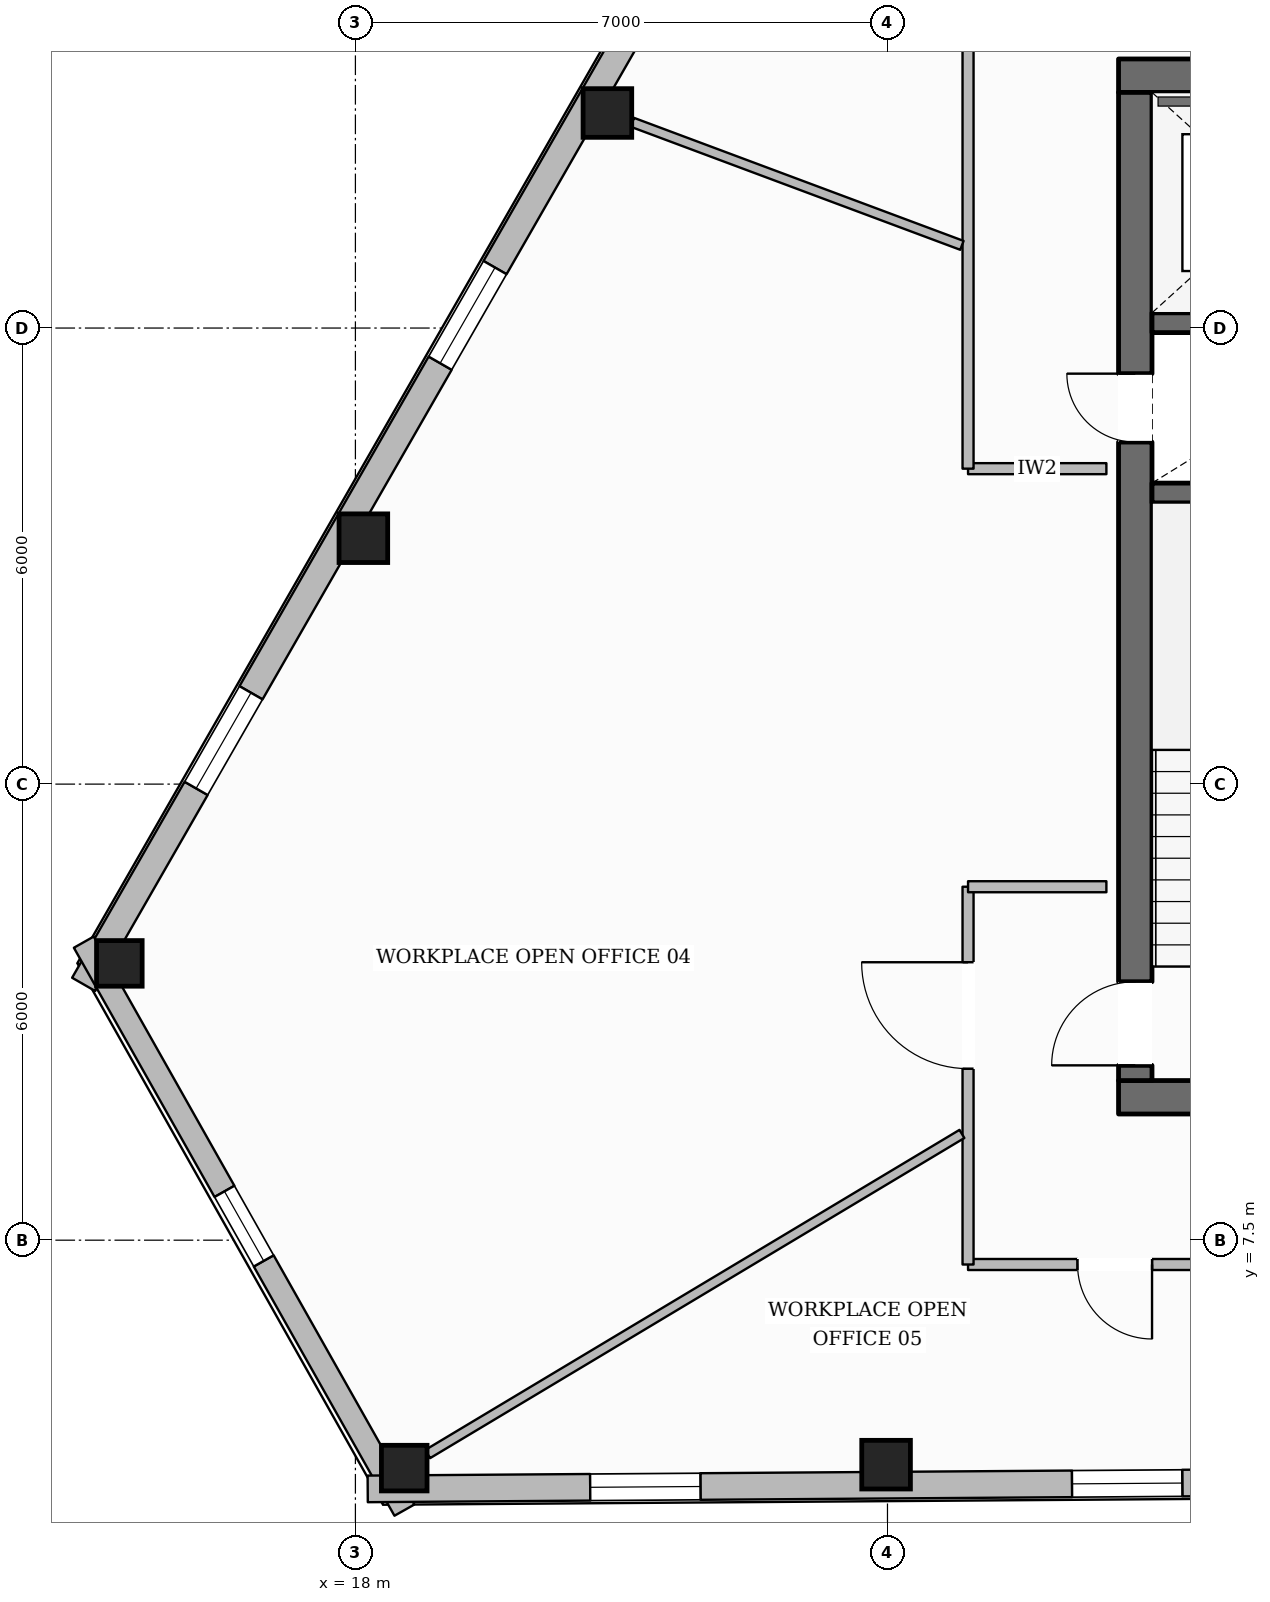
"""IFC4 building model, lengths in metres.
Left out: names, types, materials, properties, quantities, classifications, styles, units other than length and angle.
Written with IfcOpenShell. Run it as: python <this file> out.ifc"""

import sys

from ifc_helpers import new_model, si_unit, direction, frame, frame_2d, origin, origin_2d, place, context, subcontext, project, spatial, rectangle, hollow_rectangle, extrude, element, fill, save


model = new_model("IFC4")
c1 = context("Model", 3, precision=1e-05, world=origin(), true_north=direction((0.0, 1.0)))
c2 = subcontext(c1, "Body", "Model", "MODEL_VIEW")
j1 = project(units=[si_unit("LENGTHUNIT", "METRE"), si_unit("PLANEANGLEUNIT", "RADIAN")], contexts=[c1])
p1 = place(None, origin())
s1 = spatial("IfcSite", under=j1, at=p1, CompositionType="ELEMENT")
p2 = place(p1, origin())
s2 = spatial("IfcBuilding", under=s1, at=p2, CompositionType="ELEMENT")
p3 = place(p2, frame((0.0, 0.0, 226.6)))
s3 = spatial("IfcBuildingStorey", under=s2, at=p3, CompositionType="ELEMENT", Elevation=226.6)
p4 = place(p3, frame((28.04, 9.38, 0.0), z_axis=(0.0, 0.0, 1.0), x_axis=(1.0, 0.0, 0.0)))
e1 = element("IfcWall", 1, at=p4, inside=s3, PredefinedType="SOLIDWALL", context=c2, shape_type="SweptSolid", body=[
    extrude(rectangle(XDim=19.92, YDim=0.44, at=frame_2d((9.96, 0.0))), origin(), (0.0, 0.0, 1.0), 3.6),
])
p5 = place(p4, frame((10.46, 0.0, 0.0)))
e2 = element("IfcOpeningElement", 2, at=p5, cuts=e1, PredefinedType="OPENING", context=c2, shape_type="SweptSolid", body=[
    extrude(rectangle(XDim=1.4, YDim=2.2, at=frame_2d((0.7, 1.1))), frame((0.0, 0.23, 0.0), z_axis=(0.0, -1.0, 0.0), x_axis=(1.0, 0.0, 0.0)), (0.0, 0.0, 1.0), 0.46),
])
p6 = place(p3, frame((28.04, 22.82, 0.0), z_axis=(0.0, 0.0, 1.0), x_axis=(1.0, 0.0, 0.0)))
e3 = element("IfcWall", 3, at=p6, inside=s3, PredefinedType="SOLIDWALL", context=c2, shape_type="SweptSolid", body=[
    extrude(rectangle(XDim=19.92, YDim=0.44, at=frame_2d((9.96, 0.0))), origin(), (0.0, 0.0, 1.0), 3.6),
])
p7 = place(p6, frame((6.235, 0.0, 0.0)))
e4 = element("IfcOpeningElement", 4, at=p7, cuts=e3, PredefinedType="OPENING", context=c2, shape_type="SweptSolid", body=[
    extrude(rectangle(XDim=1.05, YDim=2.15, at=frame_2d((0.525, 1.075))), frame((0.0, 0.23, 0.0), z_axis=(0.0, -1.0, 0.0), x_axis=(1.0, 0.0, 0.0)), (0.0, 0.0, 1.0), 0.46),
])
p8 = place(p6, frame((12.635, 0.0, 0.0)))
e5 = element("IfcOpeningElement", 5, at=p8, cuts=e3, PredefinedType="OPENING", context=c2, shape_type="SweptSolid", body=[
    extrude(rectangle(XDim=1.05, YDim=2.15, at=frame_2d((0.525, 1.075))), frame((0.0, 0.23, 0.0), z_axis=(0.0, -1.0, 0.0), x_axis=(1.0, 0.0, 0.0)), (0.0, 0.0, 1.0), 0.46),
])
p9 = place(p3, frame((28.26, 9.6, 0.0), z_axis=(0.0, 0.0, 1.0), x_axis=(0.0, 1.0, 0.0)))
e6 = element("IfcWall", 6, at=p9, inside=s3, PredefinedType="SOLIDWALL", context=c2, shape_type="SweptSolid", body=[
    extrude(rectangle(XDim=13.0, YDim=0.44, at=frame_2d((6.5, 0.0))), origin(), (0.0, 0.0, 1.0), 3.6),
])
p10 = place(p9, frame((0.2, 0.0, 0.0)))
e7 = element("IfcOpeningElement", 7, at=p10, cuts=e6, PredefinedType="OPENING", context=c2, shape_type="SweptSolid", body=[
    extrude(rectangle(XDim=1.1, YDim=2.15, at=frame_2d((0.55, 1.075))), frame((0.0, 0.23, 0.0), z_axis=(0.0, -1.0, 0.0), x_axis=(1.0, 0.0, 0.0)), (0.0, 0.0, 1.0), 0.46),
])
p11 = place(p9, frame((8.4, 0.0, 0.0)))
e8 = element("IfcOpeningElement", 8, at=p11, cuts=e6, PredefinedType="OPENING", context=c2, shape_type="SweptSolid", body=[
    extrude(rectangle(XDim=0.9, YDim=2.1, at=frame_2d((0.45, 1.05))), frame((0.0, 0.23, 0.0), z_axis=(0.0, -1.0, 0.0), x_axis=(1.0, 0.0, 0.0)), (0.0, 0.0, 1.0), 0.46),
])
for number, where, z_axis, x_axis in (
    (9, (28.48, 17.33, 0.0), (0.0, 0.0, 1.0), (1.0, 0.0, 0.0)),
    (10, (28.48, 19.57, 0.0), (0.0, 0.0, 1.0), (1.0, 0.0, 0.0)),
):
    element("IfcWall", number, at=place(p3, frame(where, z_axis=z_axis, x_axis=x_axis)), inside=s3, PredefinedType="SHEAR", context=c2, shape_type="SweptSolid", body=[
        extrude(rectangle(XDim=3.2, YDim=0.26, at=frame_2d((1.6, 0.0))), origin(), (0.0, 0.0, 1.0), 3.6),
    ])
for number, where, z_axis, x_axis in (
    (11, (21.315, 22.329, 0.0), (0.0, 0.0, 1.0), (1.0, 0.0, 0.0)),
    (12, (18.105, 16.735, 0.0), (0.0, 0.0, 1.0), (1.0, 0.0, 0.0)),
):
    element("IfcColumn", number, at=place(p3, frame(where, z_axis=z_axis, x_axis=x_axis)), inside=s3, PredefinedType="COLUMN", context=c2, shape_type="SweptSolid", body=[
        extrude(hollow_rectangle(XDim=0.64, YDim=0.64, WallThickness=0.028, at=origin_2d()), origin(), (0.0, 0.0, 1.0), 3.6),
    ])
for number, where, z_axis, x_axis in (
    (13, (14.894, 11.141, 0.0), (0.0, 0.0, 1.0), (1.0, 0.0, 0.0)),
    (14, (18.642, 4.501, 0.0), (0.0, 0.0, 1.0), (1.0, 0.0, 0.0)),
):
    element("IfcColumn", number, at=place(p3, frame(where, z_axis=z_axis, x_axis=x_axis)), inside=s3, PredefinedType="COLUMN", context=c2, shape_type="SweptSolid", body=[
        extrude(hollow_rectangle(XDim=0.6, YDim=0.6, WallThickness=0.028, at=origin_2d()), origin(), (0.0, 0.0, 1.0), 3.6),
    ])
p12 = place(p3, frame((24.982, 4.547, 0.0), z_axis=(0.0, 0.0, 1.0), x_axis=(1.0, 0.0, 0.0)))
e15 = element("IfcColumn", 15, at=p12, inside=s3, PredefinedType="COLUMN", context=c2, shape_type="SweptSolid", body=[
    extrude(hollow_rectangle(XDim=0.64, YDim=0.64, WallThickness=0.028, at=origin_2d()), origin(), (0.0, 0.0, 1.0), 3.6),
])
p13 = place(p3, frame((14.425, 10.865, 0.0), z_axis=(0.0, 0.0, 1.0), x_axis=(0.497768108872, 0.867310157781, 0.0)))
e16 = element("IfcWall", 16, at=p13, inside=s3, PredefinedType="STANDARD", context=c2, shape_type="SweptSolid", body=[
    extrude(rectangle(XDim=39.647, YDim=0.35, at=frame_2d((19.823, 0.0))), origin(), (0.0, 0.0, 1.0), 3.132),
])
p14 = place(p13, frame((35.221, 0.0, 0.65)))
e17 = element("IfcOpeningElement", 17, at=p14, cuts=e16, PredefinedType="OPENING", context=c2, shape_type="SweptSolid", body=[
    extrude(rectangle(XDim=1.45, YDim=1.75, at=frame_2d((0.725, 0.875))), frame((0.0, 0.185, 0.0), z_axis=(0.0, -1.0, 0.0), x_axis=(1.0, 0.0, 0.0)), (0.0, 0.0, 1.0), 0.37),
])
p15 = place(p13, frame((28.771, 0.0, 0.65)))
e18 = element("IfcOpeningElement", 18, at=p15, cuts=e16, PredefinedType="OPENING", context=c2, shape_type="SweptSolid", body=[
    extrude(rectangle(XDim=1.45, YDim=1.75, at=frame_2d((0.725, 0.875))), frame((0.0, 0.185, 0.0), z_axis=(0.0, -1.0, 0.0), x_axis=(1.0, 0.0, 0.0)), (0.0, 0.0, 1.0), 0.37),
])
p16 = place(p13, frame((15.872, 0.0, 0.65)))
e19 = element("IfcOpeningElement", 19, at=p16, cuts=e16, PredefinedType="OPENING", context=c2, shape_type="SweptSolid", body=[
    extrude(rectangle(XDim=1.45, YDim=1.75, at=frame_2d((0.725, 0.875))), frame((0.0, 0.185, 0.0), z_axis=(0.0, -1.0, 0.0), x_axis=(1.0, 0.0, 0.0)), (0.0, 0.0, 1.0), 0.37),
])
p17 = place(p13, frame((9.423, 0.0, 0.65)))
e20 = element("IfcOpeningElement", 20, at=p17, cuts=e16, PredefinedType="OPENING", context=c2, shape_type="SweptSolid", body=[
    extrude(rectangle(XDim=1.45, YDim=1.75, at=frame_2d((0.725, 0.875))), frame((0.0, 0.185, 0.0), z_axis=(0.0, -1.0, 0.0), x_axis=(1.0, 0.0, 0.0)), (0.0, 0.0, 1.0), 0.37),
])
p18 = place(p13, frame((2.973, 0.0, 0.65)))
e21 = element("IfcOpeningElement", 21, at=p18, cuts=e16, PredefinedType="OPENING", context=c2, shape_type="SweptSolid", body=[
    extrude(rectangle(XDim=1.45, YDim=1.75, at=frame_2d((0.725, 0.875))), frame((0.0, 0.185, 0.0), z_axis=(0.0, -1.0, 0.0), x_axis=(1.0, 0.0, 0.0)), (0.0, 0.0, 1.0), 0.37),
])
p19 = place(p3, frame((18.645, 3.948, 0.0), z_axis=(0.0, 0.0, 1.0), x_axis=(-0.491548081962, 0.870850436711, 0.0)))
e22 = element("IfcWall", 22, at=p19, inside=s3, PredefinedType="STANDARD", context=c2, shape_type="SweptSolid", body=[
    extrude(rectangle(XDim=8.581, YDim=0.3, at=frame_2d((4.29, 0.0))), origin(), (0.0, 0.0, 1.0), 3.132),
])
p20 = place(p19, frame((3.765, 0.0, 0.65)))
e23 = element("IfcOpeningElement", 23, at=p20, cuts=e22, PredefinedType="OPENING", context=c2, shape_type="SweptSolid", body=[
    extrude(rectangle(XDim=1.05, YDim=1.7, at=frame_2d((0.525, 0.85))), frame((0.0, 0.16, 0.0), z_axis=(0.0, -1.0, 0.0), x_axis=(1.0, 0.0, 0.0)), (0.0, 0.0, 1.0), 0.32),
])
p21 = place(p3, frame((57.156, 4.507, 0.0), z_axis=(0.0, 0.0, 1.0), x_axis=(-0.999974484064, -0.007143614012, 0.0)))
e24 = element("IfcWall", 24, at=p21, inside=s3, PredefinedType="STANDARD", context=c2, shape_type="SweptSolid", body=[
    extrude(rectangle(XDim=38.995, YDim=0.35, at=frame_2d((19.498, 0.0))), origin(), (0.0, 0.0, 1.0), 3.132),
])
p22 = place(p21, frame((34.618, 0.0, 0.65)))
e25 = element("IfcOpeningElement", 25, at=p22, cuts=e24, PredefinedType="OPENING", context=c2, shape_type="SweptSolid", body=[
    extrude(rectangle(XDim=1.45, YDim=1.75, at=frame_2d((0.725, 0.875))), frame((0.0, 0.185, 0.0), z_axis=(0.0, -1.0, 0.0), x_axis=(1.0, 0.0, 0.0)), (0.0, 0.0, 1.0), 0.37),
])
p23 = place(p21, frame((28.278, 0.0, 0.65)))
e26 = element("IfcOpeningElement", 26, at=p23, cuts=e24, PredefinedType="OPENING", context=c2, shape_type="SweptSolid", body=[
    extrude(rectangle(XDim=1.45, YDim=1.75, at=frame_2d((0.725, 0.875))), frame((0.0, 0.185, 0.0), z_axis=(0.0, -1.0, 0.0), x_axis=(1.0, 0.0, 0.0)), (0.0, 0.0, 1.0), 0.37),
])
p24 = place(p21, frame((15.599, 0.0, 0.65)))
e27 = element("IfcOpeningElement", 27, at=p24, cuts=e24, PredefinedType="OPENING", context=c2, shape_type="SweptSolid", body=[
    extrude(rectangle(XDim=1.45, YDim=1.75, at=frame_2d((0.725, 0.875))), frame((0.0, 0.185, 0.0), z_axis=(0.0, -1.0, 0.0), x_axis=(1.0, 0.0, 0.0)), (0.0, 0.0, 1.0), 0.37),
])
p25 = place(p21, frame((9.26, 0.0, 0.65)))
e28 = element("IfcOpeningElement", 28, at=p25, cuts=e24, PredefinedType="OPENING", context=c2, shape_type="SweptSolid", body=[
    extrude(rectangle(XDim=1.45, YDim=1.75, at=frame_2d((0.725, 0.875))), frame((0.0, 0.185, 0.0), z_axis=(0.0, -1.0, 0.0), x_axis=(1.0, 0.0, 0.0)), (0.0, 0.0, 1.0), 0.37),
])
p26 = place(p21, frame((2.92, 0.0, 0.65)))
e29 = element("IfcOpeningElement", 29, at=p26, cuts=e24, PredefinedType="OPENING", context=c2, shape_type="SweptSolid", body=[
    extrude(rectangle(XDim=1.45, YDim=1.75, at=frame_2d((0.725, 0.875))), frame((0.0, 0.185, 0.0), z_axis=(0.0, -1.0, 0.0), x_axis=(1.0, 0.0, 0.0)), (0.0, 0.0, 1.0), 0.37),
])
p27 = place(p3, frame((27.88, 17.65, 0.0), z_axis=(0.0, 0.0, 1.0), x_axis=(-1.0, 0.0, 0.0)))
e30 = element("IfcWall", 30, at=p27, inside=s3, PredefinedType="PARTITIONING", context=c2, shape_type="SweptSolid", body=[
    extrude(rectangle(XDim=1.82, YDim=0.145, at=frame_2d((0.91, 0.0))), origin(), (0.0, 0.0, 1.0), 3.6),
])
p28 = place(p3, frame((26.06, 17.65, 0.0), z_axis=(0.0, 0.0, 1.0), x_axis=(0.0, 1.0, 0.0)))
e31 = element("IfcWall", 31, at=p28, inside=s3, PredefinedType="PARTITIONING", context=c2, shape_type="SweptSolid", body=[
    extrude(rectangle(XDim=7.37, YDim=0.145, at=frame_2d((3.685, 0.0))), origin(), (0.0, 0.0, 1.0), 3.339),
])
p29 = place(p3, frame((49.94, 7.18, 0.0), z_axis=(0.0, 0.0, 1.0), x_axis=(-1.0, 0.0, 0.0)))
e32 = element("IfcWall", 32, at=p29, inside=s3, PredefinedType="PARTITIONING", context=c2, shape_type="SweptSolid", body=[
    extrude(rectangle(XDim=23.88, YDim=0.145, at=frame_2d((11.94, 0.0))), origin(), (0.0, 0.0, 1.0), 3.339),
])
p30 = place(p29, frame((18.5, 0.0, 0.0)))
e33 = element("IfcOpeningElement", 33, at=p30, cuts=e32, PredefinedType="OPENING", context=c2, shape_type="SweptSolid", body=[
    extrude(rectangle(XDim=0.88, YDim=2.1, at=frame_2d((0.44, 1.05))), frame((0.0, 0.083, 0.0), z_axis=(0.0, -1.0, 0.0), x_axis=(1.0, 0.0, 0.0)), (0.0, 0.0, 1.0), 0.165),
])
p31 = place(p29, frame((15.98, 0.0, 0.0)))
e34 = element("IfcOpeningElement", 34, at=p31, cuts=e32, PredefinedType="OPENING", context=c2, shape_type="SweptSolid", body=[
    extrude(rectangle(XDim=0.88, YDim=2.1, at=frame_2d((0.44, 1.05))), frame((0.0, 0.083, 0.0), z_axis=(0.0, -1.0, 0.0), x_axis=(1.0, 0.0, 0.0)), (0.0, 0.0, 1.0), 0.165),
])
p32 = place(p29, frame((13.52, 0.0, 0.0)))
e35 = element("IfcOpeningElement", 35, at=p32, cuts=e32, PredefinedType="OPENING", context=c2, shape_type="SweptSolid", body=[
    extrude(rectangle(XDim=0.96, YDim=2.1, at=frame_2d((0.48, 1.05))), frame((0.0, 0.083, 0.0), z_axis=(0.0, -1.0, 0.0), x_axis=(1.0, 0.0, 0.0)), (0.0, 0.0, 1.0), 0.165),
])
p33 = place(p29, frame((21.459, 0.0, 0.0)))
e36 = element("IfcOpeningElement", 36, at=p33, cuts=e32, PredefinedType="OPENING", context=c2, shape_type="SweptSolid", body=[
    extrude(rectangle(XDim=0.98, YDim=2.15, at=frame_2d((0.49, 1.075))), frame((0.0, 0.083, 0.0), z_axis=(0.0, -1.0, 0.0), x_axis=(1.0, 0.0, 0.0)), (0.0, 0.0, 1.0), 0.165),
])
p34 = place(p29, frame((9.549, 0.0, 0.0)))
e37 = element("IfcOpeningElement", 37, at=p34, cuts=e32, PredefinedType="OPENING", context=c2, shape_type="SweptSolid", body=[
    extrude(rectangle(XDim=0.98, YDim=2.15, at=frame_2d((0.49, 1.075))), frame((0.0, 0.083, 0.0), z_axis=(0.0, -1.0, 0.0), x_axis=(1.0, 0.0, 0.0)), (0.0, 0.0, 1.0), 0.165),
])
p35 = place(p3, frame((26.06, 7.18, 0.0), z_axis=(0.0, 0.0, 1.0), x_axis=(0.0, 1.0, 0.0)))
e38 = element("IfcWall", 38, at=p35, inside=s3, PredefinedType="PARTITIONING", context=c2, shape_type="SweptSolid", body=[
    extrude(rectangle(XDim=4.97, YDim=0.145, at=frame_2d((2.485, 0.0))), origin(), (0.0, 0.0, 1.0), 3.6),
])
p36 = place(p35, frame((2.577, 0.0, 0.0)))
e39 = element("IfcOpeningElement", 39, at=p36, cuts=e38, PredefinedType="OPENING", context=c2, shape_type="SweptSolid", body=[
    extrude(rectangle(XDim=1.4, YDim=2.2, at=frame_2d((0.7, 1.1))), frame((0.0, 0.083, 0.0), z_axis=(0.0, -1.0, 0.0), x_axis=(1.0, 0.0, 0.0)), (0.0, 0.0, 1.0), 0.165),
])
p37 = place(p3, frame((26.06, 12.15, 0.0), z_axis=(0.0, 0.0, 1.0), x_axis=(1.0, 0.0, 0.0)))
e40 = element("IfcWall", 40, at=p37, inside=s3, PredefinedType="PARTITIONING", context=c2, shape_type="SweptSolid", body=[
    extrude(rectangle(XDim=1.82, YDim=0.145, at=frame_2d((0.91, 0.0))), origin(), (0.0, 0.0, 1.0), 3.6),
])
p38 = place(p3, frame((25.979, 20.588, 0.0), z_axis=(0.0, 0.0, 1.0), x_axis=(-0.936837597127, 0.34976465889, 0.0)))
e41 = element("IfcWall", 41, at=p38, inside=s3, PredefinedType="PARTITIONING", context=c2, shape_type="SweptSolid", body=[
    extrude(rectangle(XDim=4.628, YDim=0.125, at=frame_2d((2.314, 0.0))), origin(), (0.0, 0.0, 1.0), 3.6),
])
p39 = place(p3, frame((25.979, 8.898, 0.0), z_axis=(0.0, 0.0, 1.0), x_axis=(-0.857802979385, -0.513978646013, 0.0)))
e42 = element("IfcWall", 42, at=p39, inside=s3, PredefinedType="PARTITIONING", context=c2, shape_type="SweptSolid", body=[
    extrude(rectangle(XDim=8.194, YDim=0.125, at=frame_2d((4.097, 0.0))), origin(), (0.0, 0.0, 1.0), 3.141),
])
p40 = place(p17, origin())
e43 = element("IfcWindow", 43, at=p40, inside=s3, PartitioningType="SINGLE_PANEL", PredefinedType="WINDOW", context=c2, shape_type="SweptSolid", body=[
    extrude(rectangle(XDim=1.45, YDim=1.75, at=frame_2d((0.725, 0.875))), frame((0.0, 0.03, 0.0), z_axis=(0.0, -1.0, 0.0), x_axis=(1.0, 0.0, 0.0)), (0.0, 0.0, 1.0), 0.06),
])
fill(e20, e43)
p41 = place(p18, origin())
e44 = element("IfcWindow", 44, at=p41, inside=s3, PartitioningType="SINGLE_PANEL", PredefinedType="WINDOW", context=c2, shape_type="SweptSolid", body=[
    extrude(rectangle(XDim=1.45, YDim=1.75, at=frame_2d((0.725, 0.875))), frame((0.0, 0.03, 0.0), z_axis=(0.0, -1.0, 0.0), x_axis=(1.0, 0.0, 0.0)), (0.0, 0.0, 1.0), 0.06),
])
fill(e21, e44)
p42 = place(p22, origin())
e45 = element("IfcWindow", 45, at=p42, inside=s3, PartitioningType="SINGLE_PANEL", PredefinedType="WINDOW", context=c2, shape_type="SweptSolid", body=[
    extrude(rectangle(XDim=1.45, YDim=1.75, at=frame_2d((0.725, 0.875))), frame((0.0, 0.03, 0.0), z_axis=(0.0, -1.0, 0.0), x_axis=(1.0, 0.0, 0.0)), (0.0, 0.0, 1.0), 0.06),
])
fill(e25, e45)
p43 = place(p23, origin())
e46 = element("IfcWindow", 46, at=p43, inside=s3, PartitioningType="SINGLE_PANEL", PredefinedType="WINDOW", context=c2, shape_type="SweptSolid", body=[
    extrude(rectangle(XDim=1.45, YDim=1.75, at=frame_2d((0.725, 0.875))), frame((0.0, 0.03, 0.0), z_axis=(0.0, -1.0, 0.0), x_axis=(1.0, 0.0, 0.0)), (0.0, 0.0, 1.0), 0.06),
])
fill(e26, e46)
p44 = place(p20, origin())
e47 = element("IfcWindow", 47, at=p44, inside=s3, PartitioningType="SINGLE_PANEL", PredefinedType="WINDOW", context=c2, shape_type="SweptSolid", body=[
    extrude(rectangle(XDim=1.05, YDim=1.7, at=frame_2d((0.525, 0.85))), frame((0.0, 0.03, 0.0), z_axis=(0.0, -1.0, 0.0), x_axis=(1.0, 0.0, 0.0)), (0.0, 0.0, 1.0), 0.06),
])
fill(e23, e47)
p45 = place(p10, origin())
e48 = element("IfcDoor", 48, at=p45, inside=s3, OperationType="SINGLE_SWING_LEFT", PredefinedType="DOOR", context=c2, shape_type="SweptSolid", body=[
    extrude(rectangle(XDim=1.1, YDim=2.15, at=frame_2d((0.55, 1.075))), frame((0.0, 0.025, 0.0), z_axis=(0.0, -1.0, 0.0), x_axis=(1.0, 0.0, 0.0)), (0.0, 0.0, 1.0), 0.05),
])
fill(e7, e48)
p46 = place(p11, origin())
e49 = element("IfcDoor", 49, at=p46, inside=s3, OperationType="SINGLE_SWING_RIGHT", PredefinedType="DOOR", context=c2, shape_type="SweptSolid", body=[
    extrude(rectangle(XDim=0.9, YDim=2.1, at=frame_2d((0.45, 1.05))), frame((0.0, 0.025, 0.0), z_axis=(0.0, -1.0, 0.0), x_axis=(1.0, 0.0, 0.0)), (0.0, 0.0, 1.0), 0.05),
])
fill(e8, e49)
p47 = place(p36, origin())
e50 = element("IfcDoor", 50, at=p47, inside=s3, OperationType="SINGLE_SWING_RIGHT", PredefinedType="DOOR", context=c2, shape_type="SweptSolid", body=[
    extrude(rectangle(XDim=1.4, YDim=2.2, at=frame_2d((0.7, 1.1))), frame((0.0, 0.025, 0.0), z_axis=(0.0, -1.0, 0.0), x_axis=(1.0, 0.0, 0.0)), (0.0, 0.0, 1.0), 0.05),
])
fill(e39, e50)
p48 = place(p33, origin())
e51 = element("IfcDoor", 51, at=p48, inside=s3, OperationType="SINGLE_SWING_LEFT", PredefinedType="DOOR", context=c2, shape_type="SweptSolid", body=[
    extrude(rectangle(XDim=0.98, YDim=2.15, at=frame_2d((0.49, 1.075))), frame((0.0, 0.025, 0.0), z_axis=(0.0, -1.0, 0.0), x_axis=(1.0, 0.0, 0.0)), (0.0, 0.0, 1.0), 0.05),
])
fill(e36, e51)
save(model, sys.argv[1])
